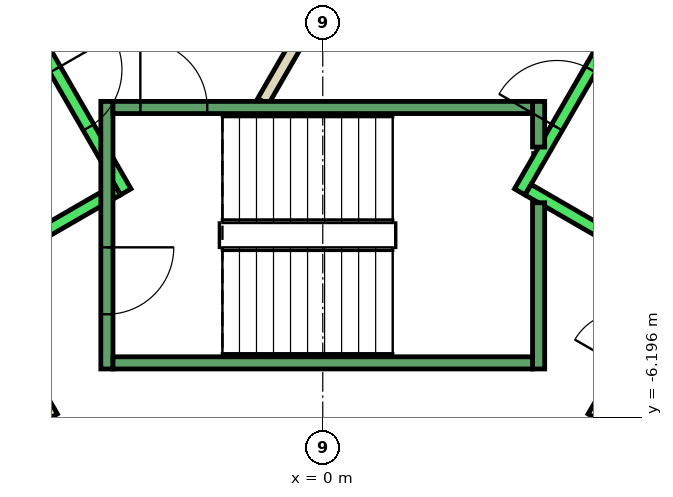
"""IFC4 building model, lengths in metres.
Left out: names, types, materials, properties, quantities, classifications, styles, units other than length and angle.
Written with IfcOpenShell. Run it as: python <this file> out.ifc"""

import sys

from ifc_helpers import new_model, si_unit, direction, frame, frame_2d, origin, place, context, subcontext, project, spatial, rectangle, extrude, element, fill, save


model = new_model("IFC4")
c1 = context("Model", 3, precision=1e-05, world=origin(), true_north=direction((0.0, 1.0)))
c2 = subcontext(c1, "Body", "Model", "MODEL_VIEW")
j1 = project(units=[si_unit("LENGTHUNIT", "METRE"), si_unit("PLANEANGLEUNIT", "RADIAN")], contexts=[c1])
p1 = place(None, origin())
s1 = spatial("IfcSite", under=j1, at=p1, CompositionType="ELEMENT")
p2 = place(p1, origin())
s2 = spatial("IfcBuilding", under=s1, at=p2, CompositionType="ELEMENT")
p3 = place(p2, frame((0.0, 0.0, 259.4)))
s3 = spatial("IfcBuildingStorey", under=s2, at=p3, CompositionType="ELEMENT", Elevation=259.4)
p4 = place(p3, frame((4.451, -6.19, 0.0), z_axis=(0.0, 0.0, 1.0), x_axis=(0.500011755427, 0.866018616679, 0.0)))
e1 = element("IfcWall", 1, at=p4, inside=s3, PredefinedType="PARTITIONING", context=c2, shape_type="SweptSolid", body=[
    extrude(rectangle(XDim=2.8, YDim=0.2, at=frame_2d((1.4, 0.0))), origin(), (0.0, 0.0, 1.0), 3.26),
])
p5 = place(p4, frame((0.95, 0.0, 0.0)))
e2 = element("IfcOpeningElement", 2, at=p5, cuts=e1, PredefinedType="OPENING", context=c2, shape_type="SweptSolid", body=[
    extrude(rectangle(XDim=0.9, YDim=2.1, at=frame_2d((0.45, 1.05))), frame((0.0, 0.11, 0.0), z_axis=(0.0, -1.0, 0.0), x_axis=(1.0, 0.0, 0.0)), (0.0, 0.0, 1.0), 0.22),
])
p6 = place(p3, frame((-5.851, -3.765, 0.0), z_axis=(0.0, 0.0, 1.0), x_axis=(0.500011755427, -0.866018616679, 0.0)))
e3 = element("IfcWall", 3, at=p6, inside=s3, PredefinedType="PARTITIONING", context=c2, shape_type="SweptSolid", body=[
    extrude(rectangle(XDim=2.8, YDim=0.2, at=frame_2d((1.4, 0.0))), origin(), (0.0, 0.0, 1.0), 3.26),
])
p7 = place(p6, frame((0.95, 0.0, 0.0)))
e4 = element("IfcOpeningElement", 4, at=p7, cuts=e3, PredefinedType="OPENING", context=c2, shape_type="SweptSolid", body=[
    extrude(rectangle(XDim=0.9, YDim=2.1, at=frame_2d((0.45, 1.05))), frame((0.0, 0.11, 0.0), z_axis=(0.0, -1.0, 0.0), x_axis=(1.0, 0.0, 0.0)), (0.0, 0.0, 1.0), 0.22),
])
p8 = place(p3, frame((-0.982, -1.0, 0.0), z_axis=(0.0, 0.0, 1.0), x_axis=(0.50024047865, 0.865886518847, 0.0)))
e5 = element("IfcWall", 5, at=p8, inside=s3, PredefinedType="PARTITIONING", context=c2, shape_type="SweptSolid", body=[
    extrude(rectangle(XDim=1.863, YDim=0.2, at=frame_2d((0.931, 0.0))), origin(), (0.0, 0.0, 1.0), 3.26),
])
p9 = place(p3, frame((-5.94, 2.188, 0.0), z_axis=(0.0, 0.0, 1.0), x_axis=(0.500034260056, -0.866005622828, 0.0)))
e6 = element("IfcWall", 6, at=p9, inside=s3, PredefinedType="STANDARD", context=c2, shape_type="SweptSolid", body=[
    extrude(rectangle(XDim=5.399, YDim=0.2, at=frame_2d((2.7, 0.0))), origin(), (0.0, 0.0, 1.0), 3.26),
])
p10 = place(p9, frame((3.075, 0.0, 0.0)))
e7 = element("IfcOpeningElement", 7, at=p10, cuts=e6, PredefinedType="OPENING", context=c2, shape_type="SweptSolid", body=[
    extrude(rectangle(XDim=1.1, YDim=2.1, at=frame_2d((0.55, 1.05))), frame((0.0, 0.11, 0.0), z_axis=(0.0, -1.0, 0.0), x_axis=(1.0, 0.0, 0.0)), (0.0, 0.0, 1.0), 0.22),
])
p11 = place(p9, frame((1.225, 0.0, 0.0)))
e8 = element("IfcOpeningElement", 8, at=p11, cuts=e6, PredefinedType="OPENING", context=c2, shape_type="SweptSolid", body=[
    extrude(rectangle(XDim=1.1, YDim=2.1, at=frame_2d((0.55, 1.05))), frame((0.0, 0.11, 0.0), z_axis=(0.0, -1.0, 0.0), x_axis=(1.0, 0.0, 0.0)), (0.0, 0.0, 1.0), 0.22),
])
p12 = place(p3, frame((-3.377, -2.452, 0.0), z_axis=(0.0, 0.0, 1.0), x_axis=(-0.865955154139, -0.50012165622, 0.0)))
e9 = element("IfcWall", 9, at=p12, inside=s3, PredefinedType="STANDARD", context=c2, shape_type="SweptSolid", body=[
    extrude(rectangle(XDim=2.4, YDim=0.2, at=frame_2d((1.2, 0.0))), origin(), (0.0, 0.0, 1.0), 3.26),
])
p13 = place(p3, frame((3.24, -2.488, 0.0), z_axis=(0.0, 0.0, 1.0), x_axis=(0.500034260056, 0.866005622828, 0.0)))
e10 = element("IfcWall", 10, at=p13, inside=s3, PredefinedType="STANDARD", context=c2, shape_type="SweptSolid", body=[
    extrude(rectangle(XDim=5.399, YDim=0.2, at=frame_2d((2.7, 0.0))), origin(), (0.0, 0.0, 1.0), 3.26),
])
p14 = place(p13, frame((3.225, 0.0, 0.0)))
e11 = element("IfcOpeningElement", 11, at=p14, cuts=e10, PredefinedType="OPENING", context=c2, shape_type="SweptSolid", body=[
    extrude(rectangle(XDim=1.1, YDim=2.1, at=frame_2d((0.55, 1.05))), frame((0.0, 0.11, 0.0), z_axis=(0.0, -1.0, 0.0), x_axis=(1.0, 0.0, 0.0)), (0.0, 0.0, 1.0), 0.22),
])
p15 = place(p13, frame((1.225, 0.0, 0.0)))
e12 = element("IfcOpeningElement", 12, at=p15, cuts=e10, PredefinedType="OPENING", context=c2, shape_type="SweptSolid", body=[
    extrude(rectangle(XDim=1.1, YDim=2.1, at=frame_2d((0.55, 1.05))), frame((0.0, 0.11, 0.0), z_axis=(0.0, -1.0, 0.0), x_axis=(1.0, 0.0, 0.0)), (0.0, 0.0, 1.0), 0.22),
])
p16 = place(p3, frame((3.377, -2.452, 0.0), z_axis=(0.0, 0.0, 1.0), x_axis=(0.865955154139, -0.50012165622, 0.0)))
e13 = element("IfcWall", 13, at=p16, inside=s3, PredefinedType="STANDARD", context=c2, shape_type="SweptSolid", body=[
    extrude(rectangle(XDim=2.4, YDim=0.2, at=frame_2d((1.2, 0.0))), origin(), (0.0, 0.0, 1.0), 3.26),
])
p17 = place(p3, frame((-3.55, -1.0, 0.0), z_axis=(0.0, 0.0, 1.0), x_axis=(0.0, -1.0, 0.0)))
e14 = element("IfcWall", 14, at=p17, inside=s3, PredefinedType="STANDARD", context=c2, shape_type="SweptSolid", body=[
    extrude(rectangle(XDim=4.4, YDim=0.2, at=frame_2d((2.2, 0.0))), origin(), (0.0, 0.0, 1.0), 3.26),
])
p18 = place(p17, frame((2.4, 0.0, 0.0)))
e15 = element("IfcOpeningElement", 15, at=p18, cuts=e14, PredefinedType="OPENING", context=c2, shape_type="SweptSolid", body=[
    extrude(rectangle(XDim=1.1, YDim=2.2, at=frame_2d((0.55, 1.1))), frame((0.0, 0.11, 0.0), z_axis=(0.0, -1.0, 0.0), x_axis=(1.0, 0.0, 0.0)), (0.0, 0.0, 1.0), 0.22),
])
p19 = place(p3, frame((3.55, -2.667, 0.0), z_axis=(0.0, 0.0, 1.0), x_axis=(0.0, -1.0, 0.0)))
e16 = element("IfcWall", 16, at=p19, inside=s3, PredefinedType="STANDARD", context=c2, shape_type="SweptSolid", body=[
    extrude(rectangle(XDim=2.733, YDim=0.2, at=frame_2d((1.366, 0.0))), origin(), (0.0, 0.0, 1.0), 3.26),
])
p20 = place(p3, frame((3.55, -1.0, 0.0), z_axis=(0.0, 0.0, 1.0), x_axis=(0.0, -1.0, 0.0)))
e17 = element("IfcWall", 17, at=p20, inside=s3, PredefinedType="STANDARD", context=c2, shape_type="SweptSolid", body=[
    extrude(rectangle(XDim=0.751, YDim=0.2, at=frame_2d((0.375, 0.0))), origin(), (0.0, 0.0, 1.0), 3.26),
])
p21 = place(p3, frame((-3.45, -1.1, 0.0), z_axis=(0.0, 0.0, 1.0), x_axis=(1.0, 0.0, 0.0)))
e18 = element("IfcWall", 18, at=p21, inside=s3, PredefinedType="STANDARD", context=c2, shape_type="SweptSolid", body=[
    extrude(rectangle(XDim=6.9, YDim=0.2, at=frame_2d((3.45, 0.0))), origin(), (0.0, 0.0, 1.0), 3.26),
])
p22 = place(p21, frame((0.45, 0.0, 0.0)))
e19 = element("IfcOpeningElement", 19, at=p22, cuts=e18, PredefinedType="OPENING", context=c2, shape_type="SweptSolid", body=[
    extrude(rectangle(XDim=1.1, YDim=2.2, at=frame_2d((0.55, 1.1))), frame((0.0, 0.11, 0.0), z_axis=(0.0, -1.0, 0.0), x_axis=(1.0, 0.0, 0.0)), (0.0, 0.0, 1.0), 0.22),
])
p23 = place(p3, frame((-3.45, -5.3, 0.0), z_axis=(0.0, 0.0, 1.0), x_axis=(1.0, 0.0, 0.0)))
e20 = element("IfcWall", 20, at=p23, inside=s3, PredefinedType="STANDARD", context=c2, shape_type="SweptSolid", body=[
    extrude(rectangle(XDim=6.9, YDim=0.2, at=frame_2d((3.45, 0.0))), origin(), (0.0, 0.0, 1.0), 3.26),
])
p24 = place(p10, origin())
e21 = element("IfcDoor", 21, at=p24, inside=s3, OperationType="SLIDING_TO_LEFT", PredefinedType="DOOR", context=c2, shape_type="SweptSolid", body=[
    extrude(rectangle(XDim=1.1, YDim=2.1, at=frame_2d((0.55, 1.05))), frame((0.0, 0.025, 0.0), z_axis=(0.0, -1.0, 0.0), x_axis=(1.0, 0.0, 0.0)), (0.0, 0.0, 1.0), 0.05),
])
fill(e7, e21)
p25 = place(p15, origin())
e22 = element("IfcDoor", 22, at=p25, inside=s3, OperationType="SLIDING_TO_LEFT", PredefinedType="DOOR", context=c2, shape_type="SweptSolid", body=[
    extrude(rectangle(XDim=1.1, YDim=2.1, at=frame_2d((0.55, 1.05))), frame((0.0, 0.025, 0.0), z_axis=(0.0, -1.0, 0.0), x_axis=(1.0, 0.0, 0.0)), (0.0, 0.0, 1.0), 0.05),
])
fill(e12, e22)
p26 = place(p22, origin())
e23 = element("IfcDoor", 23, at=p26, inside=s3, OperationType="SINGLE_SWING_LEFT", PredefinedType="DOOR", context=c2, shape_type="SweptSolid", body=[
    extrude(rectangle(XDim=1.1, YDim=2.2, at=frame_2d((0.55, 1.1))), frame((0.0, 0.025, 0.0), z_axis=(0.0, -1.0, 0.0), x_axis=(1.0, 0.0, 0.0)), (0.0, 0.0, 1.0), 0.05),
])
fill(e19, e23)
p27 = place(p18, origin())
e24 = element("IfcDoor", 24, at=p27, inside=s3, OperationType="SINGLE_SWING_LEFT", PredefinedType="DOOR", context=c2, shape_type="SweptSolid", body=[
    extrude(rectangle(XDim=1.1, YDim=2.2, at=frame_2d((0.55, 1.1))), frame((0.0, 0.025, 0.0), z_axis=(0.0, -1.0, 0.0), x_axis=(1.0, 0.0, 0.0)), (0.0, 0.0, 1.0), 0.05),
])
fill(e15, e24)
save(model, sys.argv[1])
